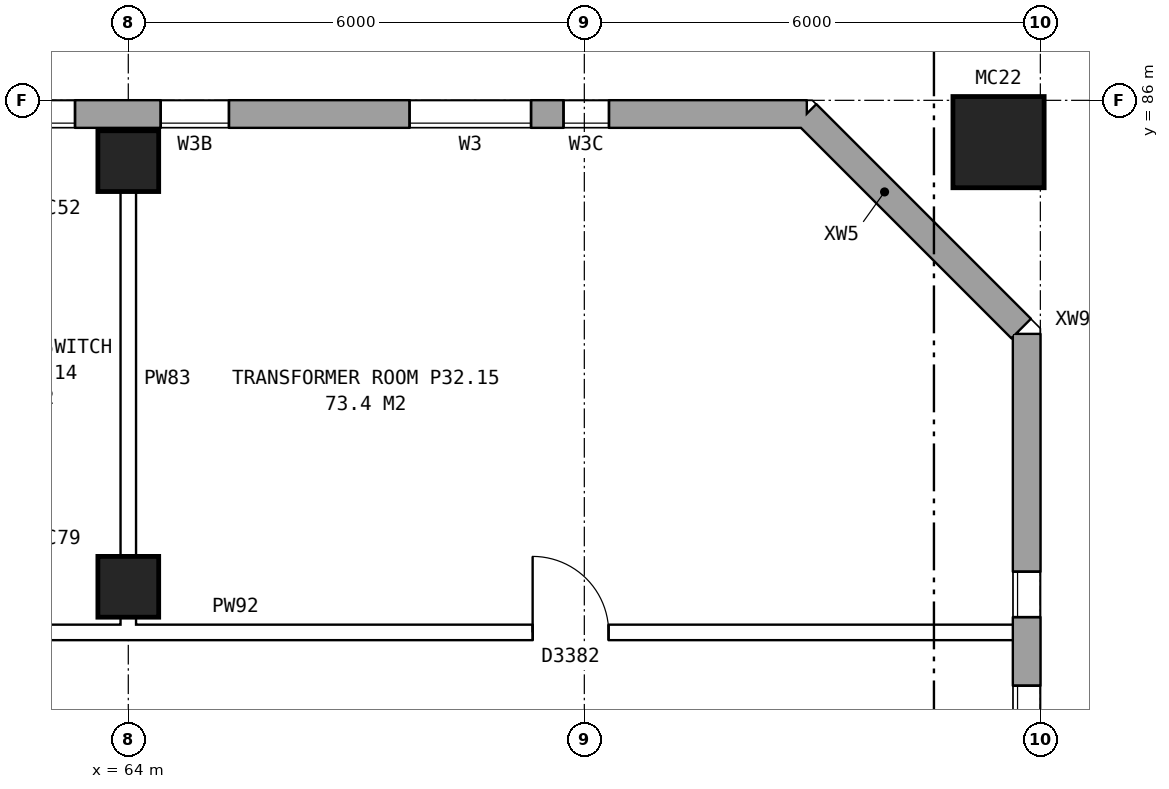
"""IFC4 building model, lengths in metres.
Left out: names, types, materials, properties, quantities, classifications, styles, units other than length and angle.
Written with IfcOpenShell. Run it as: python <this file> out.ifc"""

import sys

from ifc_helpers import new_model, si_unit, direction, frame, frame_2d, origin, origin_2d, place, context, subcontext, project, spatial, rectangle, hollow_rectangle, extrude, element, fill, save


model = new_model("IFC4")
c1 = context("Model", 3, precision=1e-05, world=origin(), true_north=direction((0.0, 1.0)))
c2 = subcontext(c1, "Body", "Model", "MODEL_VIEW")
j1 = project(units=[si_unit("LENGTHUNIT", "METRE"), si_unit("PLANEANGLEUNIT", "RADIAN")], contexts=[c1])
p1 = place(None, origin())
s1 = spatial("IfcSite", under=j1, at=p1, CompositionType="ELEMENT")
p2 = place(p1, origin())
s2 = spatial("IfcBuilding", under=s1, at=p2, CompositionType="ELEMENT")
p3 = place(p2, frame((0.0, 0.0, 115.0)))
s3 = spatial("IfcBuildingStorey", under=s2, at=p3, CompositionType="ELEMENT", Elevation=115.0)
for number, where, z_axis, x_axis in (
    (1, (64.0, 79.6, 0.0), (0.0, 0.0, 1.0), (1.0, 0.0, 0.0)),
    (2, (64.0, 85.2, 0.0), (0.0, 0.0, 1.0), (1.0, 0.0, 0.0)),
):
    element("IfcColumn", number, at=place(p3, frame(where, z_axis=z_axis, x_axis=x_axis)), inside=s3, PredefinedType="COLUMN", context=c2, shape_type="SweptSolid", body=[
        extrude(rectangle(XDim=0.8, YDim=0.8, at=origin_2d()), origin(), (0.0, 0.0, 1.0), 4.2),
    ])
p4 = place(p3, frame((75.45, 85.45, 0.0), z_axis=(0.0, 0.0, 1.0), x_axis=(1.0, 0.0, 0.0)))
e3 = element("IfcColumn", 3, at=p4, inside=s3, PredefinedType="COLUMN", context=c2, shape_type="SweptSolid", body=[
    extrude(hollow_rectangle(XDim=1.2, YDim=1.2, WallThickness=0.065, at=origin_2d()), origin(), (0.0, 0.0, 1.0), 4.5),
])
p5 = place(p3, frame((75.82, 57.075, 0.0), z_axis=(0.0, 0.0, 1.0), x_axis=(0.0, 1.0, 0.0)))
e4 = element("IfcWall", 4, at=p5, inside=s3, PredefinedType="STANDARD", context=c2, shape_type="SweptSolid", body=[
    extrude(rectangle(XDim=25.851, YDim=0.36, at=frame_2d((12.925, 0.0))), origin(), (0.0, 0.0, 1.0), 4.2),
])
p6 = place(p5, frame((2.9, 0.0, 1.5)))
e5 = element("IfcOpeningElement", 5, at=p6, cuts=e4, PredefinedType="OPENING", context=c2, shape_type="SweptSolid", body=[
    extrude(rectangle(XDim=0.6, YDim=1.2, at=frame_2d((0.3, 0.6))), frame((0.0, 0.19, 0.0), z_axis=(0.0, -1.0, 0.0), x_axis=(1.0, 0.0, 0.0)), (0.0, 0.0, 1.0), 0.38),
])
p7 = place(p5, frame((3.925, 0.0, 1.5)))
e6 = element("IfcOpeningElement", 6, at=p7, cuts=e4, PredefinedType="OPENING", context=c2, shape_type="SweptSolid", body=[
    extrude(rectangle(XDim=0.6, YDim=1.2, at=frame_2d((0.3, 0.6))), frame((0.0, 0.19, 0.0), z_axis=(0.0, -1.0, 0.0), x_axis=(1.0, 0.0, 0.0)), (0.0, 0.0, 1.0), 0.38),
])
p8 = place(p5, frame((19.625, 0.0, 1.5)))
e7 = element("IfcOpeningElement", 7, at=p8, cuts=e4, PredefinedType="OPENING", context=c2, shape_type="SweptSolid", body=[
    extrude(rectangle(XDim=1.6, YDim=1.2, at=frame_2d((0.8, 0.6))), frame((0.0, 0.19, 0.0), z_axis=(0.0, -1.0, 0.0), x_axis=(1.0, 0.0, 0.0)), (0.0, 0.0, 1.0), 0.38),
])
p9 = place(p5, frame((22.125, 0.0, 1.5)))
e8 = element("IfcOpeningElement", 8, at=p9, cuts=e4, PredefinedType="OPENING", context=c2, shape_type="SweptSolid", body=[
    extrude(rectangle(XDim=0.6, YDim=1.2, at=frame_2d((0.3, 0.6))), frame((0.0, 0.19, 0.0), z_axis=(0.0, -1.0, 0.0), x_axis=(1.0, 0.0, 0.0)), (0.0, 0.0, 1.0), 0.38),
])
p10 = place(p3, frame((75.746, 82.999, 0.953), z_axis=(0.0, 0.0, 1.0), x_axis=(-0.706994764273, 0.707218780358, 0.0)))
e9 = element("IfcWall", 9, at=p10, inside=s3, PredefinedType="STANDARD", context=c2, shape_type="SweptSolid", body=[
    extrude(rectangle(XDim=1.09, YDim=0.36, at=frame_2d((0.545, 0.0))), origin(), (0.0, 0.0, 1.0), 2.444),
])
p11 = place(p3, frame((74.976, 83.77, 0.0), z_axis=(0.0, 0.0, 1.0), x_axis=(-0.707148882153, 0.707064677713, 0.0)))
e10 = element("IfcWall", 10, at=p11, inside=s3, PredefinedType="STANDARD", context=c2, shape_type="SweptSolid", body=[
    extrude(rectangle(XDim=2.899, YDim=0.36, at=frame_2d((1.45, 0.0))), origin(), (0.0, 0.0, 1.0), 4.2),
])
p12 = place(p3, frame((72.925, 85.82, 0.0), z_axis=(0.0, 0.0, 1.0), x_axis=(-1.0, 0.0, 0.0)))
e11 = element("IfcWall", 11, at=p12, inside=s3, PredefinedType="STANDARD", context=c2, shape_type="SweptSolid", body=[
    extrude(rectangle(XDim=43.101, YDim=0.36, at=frame_2d((21.55, 0.0))), origin(), (0.0, 0.0, 1.0), 4.2),
])
p13 = place(p12, frame((2.6, 0.0, 1.5)))
e12 = element("IfcOpeningElement", 12, at=p13, cuts=e11, PredefinedType="OPENING", context=c2, shape_type="SweptSolid", body=[
    extrude(rectangle(XDim=0.6, YDim=1.2, at=frame_2d((0.3, 0.6))), frame((0.0, 0.19, 0.0), z_axis=(0.0, -1.0, 0.0), x_axis=(1.0, 0.0, 0.0)), (0.0, 0.0, 1.0), 0.38),
])
p14 = place(p12, frame((3.625, 0.0, 1.5)))
e13 = element("IfcOpeningElement", 13, at=p14, cuts=e11, PredefinedType="OPENING", context=c2, shape_type="SweptSolid", body=[
    extrude(rectangle(XDim=1.6, YDim=1.2, at=frame_2d((0.8, 0.6))), frame((0.0, 0.19, 0.0), z_axis=(0.0, -1.0, 0.0), x_axis=(1.0, 0.0, 0.0)), (0.0, 0.0, 1.0), 0.38),
])
p15 = place(p12, frame((7.6, 0.0, 1.5)))
e14 = element("IfcOpeningElement", 14, at=p15, cuts=e11, PredefinedType="OPENING", context=c2, shape_type="SweptSolid", body=[
    extrude(rectangle(XDim=0.9, YDim=1.2, at=frame_2d((0.45, 0.6))), frame((0.0, 0.19, 0.0), z_axis=(0.0, -1.0, 0.0), x_axis=(1.0, 0.0, 0.0)), (0.0, 0.0, 1.0), 0.38),
])
p16 = place(p12, frame((9.625, 0.0, 1.5)))
e15 = element("IfcOpeningElement", 15, at=p16, cuts=e11, PredefinedType="OPENING", context=c2, shape_type="SweptSolid", body=[
    extrude(rectangle(XDim=1.6, YDim=1.2, at=frame_2d((0.8, 0.6))), frame((0.0, 0.19, 0.0), z_axis=(0.0, -1.0, 0.0), x_axis=(1.0, 0.0, 0.0)), (0.0, 0.0, 1.0), 0.38),
])
p17 = place(p12, frame((11.525, 0.0, 1.5)))
e16 = element("IfcOpeningElement", 16, at=p17, cuts=e11, PredefinedType="OPENING", context=c2, shape_type="SweptSolid", body=[
    extrude(rectangle(XDim=0.6, YDim=1.2, at=frame_2d((0.3, 0.6))), frame((0.0, 0.19, 0.0), z_axis=(0.0, -1.0, 0.0), x_axis=(1.0, 0.0, 0.0)), (0.0, 0.0, 1.0), 0.38),
])
p18 = place(p12, frame((15.625, 0.0, 1.5)))
e17 = element("IfcOpeningElement", 17, at=p18, cuts=e11, PredefinedType="OPENING", context=c2, shape_type="SweptSolid", body=[
    extrude(rectangle(XDim=1.6, YDim=1.2, at=frame_2d((0.8, 0.6))), frame((0.0, 0.19, 0.0), z_axis=(0.0, -1.0, 0.0), x_axis=(1.0, 0.0, 0.0)), (0.0, 0.0, 1.0), 0.38),
])
p19 = place(p12, frame((20.075, 0.0, 1.5)))
e18 = element("IfcOpeningElement", 18, at=p19, cuts=e11, PredefinedType="OPENING", context=c2, shape_type="SweptSolid", body=[
    extrude(rectangle(XDim=1.2, YDim=1.2, at=frame_2d((0.6, 0.6))), frame((0.0, 0.19, 0.0), z_axis=(0.0, -1.0, 0.0), x_axis=(1.0, 0.0, 0.0)), (0.0, 0.0, 1.0), 0.38),
])
p20 = place(p12, frame((21.625, 0.0, 1.5)))
e19 = element("IfcOpeningElement", 19, at=p20, cuts=e11, PredefinedType="OPENING", context=c2, shape_type="SweptSolid", body=[
    extrude(rectangle(XDim=1.6, YDim=1.2, at=frame_2d((0.8, 0.6))), frame((0.0, 0.19, 0.0), z_axis=(0.0, -1.0, 0.0), x_axis=(1.0, 0.0, 0.0)), (0.0, 0.0, 1.0), 0.38),
])
p21 = place(p12, frame((24.125, 0.0, 1.5)))
e20 = element("IfcOpeningElement", 20, at=p21, cuts=e11, PredefinedType="OPENING", context=c2, shape_type="SweptSolid", body=[
    extrude(rectangle(XDim=0.6, YDim=1.2, at=frame_2d((0.3, 0.6))), frame((0.0, 0.19, 0.0), z_axis=(0.0, -1.0, 0.0), x_axis=(1.0, 0.0, 0.0)), (0.0, 0.0, 1.0), 0.38),
])
p22 = place(p12, frame((27.625, 0.0, 1.5)))
e21 = element("IfcOpeningElement", 21, at=p22, cuts=e11, PredefinedType="OPENING", context=c2, shape_type="SweptSolid", body=[
    extrude(rectangle(XDim=1.6, YDim=1.2, at=frame_2d((0.8, 0.6))), frame((0.0, 0.19, 0.0), z_axis=(0.0, -1.0, 0.0), x_axis=(1.0, 0.0, 0.0)), (0.0, 0.0, 1.0), 0.38),
])
p23 = place(p12, frame((32.525, 0.0, 1.5)))
e22 = element("IfcOpeningElement", 22, at=p23, cuts=e11, PredefinedType="OPENING", context=c2, shape_type="SweptSolid", body=[
    extrude(rectangle(XDim=0.6, YDim=1.2, at=frame_2d((0.3, 0.6))), frame((0.0, 0.19, 0.0), z_axis=(0.0, -1.0, 0.0), x_axis=(1.0, 0.0, 0.0)), (0.0, 0.0, 1.0), 0.38),
])
p24 = place(p12, frame((33.625, 0.0, 1.5)))
e23 = element("IfcOpeningElement", 23, at=p24, cuts=e11, PredefinedType="OPENING", context=c2, shape_type="SweptSolid", body=[
    extrude(rectangle(XDim=1.6, YDim=1.2, at=frame_2d((0.8, 0.6))), frame((0.0, 0.19, 0.0), z_axis=(0.0, -1.0, 0.0), x_axis=(1.0, 0.0, 0.0)), (0.0, 0.0, 1.0), 0.38),
])
p25 = place(p12, frame((36.125, 0.0, 1.5)))
e24 = element("IfcOpeningElement", 24, at=p25, cuts=e11, PredefinedType="OPENING", context=c2, shape_type="SweptSolid", body=[
    extrude(rectangle(XDim=0.9, YDim=1.2, at=frame_2d((0.45, 0.6))), frame((0.0, 0.19, 0.0), z_axis=(0.0, -1.0, 0.0), x_axis=(1.0, 0.0, 0.0)), (0.0, 0.0, 1.0), 0.38),
])
p26 = place(p12, frame((39.625, 0.0, 1.5)))
e25 = element("IfcOpeningElement", 25, at=p26, cuts=e11, PredefinedType="OPENING", context=c2, shape_type="SweptSolid", body=[
    extrude(rectangle(XDim=1.6, YDim=1.2, at=frame_2d((0.8, 0.6))), frame((0.0, 0.19, 0.0), z_axis=(0.0, -1.0, 0.0), x_axis=(1.0, 0.0, 0.0)), (0.0, 0.0, 1.0), 0.38),
])
p27 = place(p3, frame((30.9, 79.0, 0.0), z_axis=(0.0, 0.0, 1.0), x_axis=(1.0, 0.0, 0.0)))
e26 = element("IfcWall", 26, at=p27, inside=s3, PredefinedType="PARTITIONING", context=c2, shape_type="SweptSolid", body=[
    extrude(rectangle(XDim=44.86, YDim=0.2, at=frame_2d((22.43, 0.0))), origin(), (0.0, 0.0, 1.0), 4.2),
])
p28 = place(p27, frame((2.6, 0.0, 0.0)))
e27 = element("IfcOpeningElement", 27, at=p28, cuts=e26, PredefinedType="OPENING", context=c2, shape_type="SweptSolid", body=[
    extrude(rectangle(XDim=1.0, YDim=2.1, at=frame_2d((0.5, 1.05))), frame((0.0, 0.11, 0.0), z_axis=(0.0, -1.0, 0.0), x_axis=(1.0, 0.0, 0.0)), (0.0, 0.0, 1.0), 0.22),
])
p29 = place(p27, frame((9.5, 0.0, 0.0)))
e28 = element("IfcOpeningElement", 28, at=p29, cuts=e26, PredefinedType="OPENING", context=c2, shape_type="SweptSolid", body=[
    extrude(rectangle(XDim=1.0, YDim=2.1, at=frame_2d((0.5, 1.05))), frame((0.0, 0.11, 0.0), z_axis=(0.0, -1.0, 0.0), x_axis=(1.0, 0.0, 0.0)), (0.0, 0.0, 1.0), 0.22),
])
p30 = place(p27, frame((14.6, 0.0, 0.0)))
e29 = element("IfcOpeningElement", 29, at=p30, cuts=e26, PredefinedType="OPENING", context=c2, shape_type="SweptSolid", body=[
    extrude(rectangle(XDim=1.0, YDim=2.1, at=frame_2d((0.5, 1.05))), frame((0.0, 0.11, 0.0), z_axis=(0.0, -1.0, 0.0), x_axis=(1.0, 0.0, 0.0)), (0.0, 0.0, 1.0), 0.22),
])
p31 = place(p27, frame((22.1, 0.0, 0.0)))
e30 = element("IfcOpeningElement", 30, at=p31, cuts=e26, PredefinedType="OPENING", context=c2, shape_type="SweptSolid", body=[
    extrude(rectangle(XDim=1.0, YDim=2.1, at=frame_2d((0.5, 1.05))), frame((0.0, 0.11, 0.0), z_axis=(0.0, -1.0, 0.0), x_axis=(1.0, 0.0, 0.0)), (0.0, 0.0, 1.0), 0.22),
])
p32 = place(p27, frame((29.6, 0.0, 0.0)))
e31 = element("IfcOpeningElement", 31, at=p32, cuts=e26, PredefinedType="OPENING", context=c2, shape_type="SweptSolid", body=[
    extrude(rectangle(XDim=1.0, YDim=2.1, at=frame_2d((0.5, 1.05))), frame((0.0, 0.11, 0.0), z_axis=(0.0, -1.0, 0.0), x_axis=(1.0, 0.0, 0.0)), (0.0, 0.0, 1.0), 0.22),
])
p33 = place(p27, frame((38.42, 0.0, 0.0)))
e32 = element("IfcOpeningElement", 32, at=p33, cuts=e26, PredefinedType="OPENING", context=c2, shape_type="SweptSolid", body=[
    extrude(rectangle(XDim=1.0, YDim=2.1, at=frame_2d((0.5, 1.05))), frame((0.0, 0.11, 0.0), z_axis=(0.0, -1.0, 0.0), x_axis=(1.0, 0.0, 0.0)), (0.0, 0.0, 1.0), 0.22),
])
p34 = place(p3, frame((64.0, 78.9, 0.0), z_axis=(0.0, 0.0, 1.0), x_axis=(0.0, 1.0, 0.0)))
e33 = element("IfcWall", 33, at=p34, inside=s3, PredefinedType="PARTITIONING", context=c2, shape_type="SweptSolid", body=[
    extrude(rectangle(XDim=6.86, YDim=0.2, at=frame_2d((3.43, 0.0))), origin(), (0.0, 0.0, 1.0), 4.2),
])
p35 = place(p8, origin())
e34 = element("IfcWindow", 34, at=p35, inside=s3, PartitioningType="DOUBLE_PANEL_HORIZONTAL", PredefinedType="WINDOW", context=c2, shape_type="SweptSolid", body=[
    extrude(rectangle(XDim=1.6, YDim=1.2, at=frame_2d((0.8, 0.6))), frame((0.0, 0.15, 0.0), z_axis=(0.0, -1.0, 0.0), x_axis=(1.0, 0.0, 0.0)), (0.0, 0.0, 1.0), 0.06),
])
fill(e7, e34)
p36 = place(p9, origin())
e35 = element("IfcWindow", 35, at=p36, inside=s3, PartitioningType="DOUBLE_PANEL_HORIZONTAL", PredefinedType="WINDOW", context=c2, shape_type="SweptSolid", body=[
    extrude(rectangle(XDim=0.6, YDim=1.2, at=frame_2d((0.3, 0.6))), frame((0.0, 0.15, 0.0), z_axis=(0.0, -1.0, 0.0), x_axis=(1.0, 0.0, 0.0)), (0.0, 0.0, 1.0), 0.06),
])
fill(e8, e35)
p37 = place(p13, origin())
e36 = element("IfcWindow", 36, at=p37, inside=s3, PartitioningType="DOUBLE_PANEL_HORIZONTAL", PredefinedType="WINDOW", context=c2, shape_type="SweptSolid", body=[
    extrude(rectangle(XDim=0.6, YDim=1.2, at=frame_2d((0.3, 0.6))), frame((0.0, 0.15, 0.0), z_axis=(0.0, -1.0, 0.0), x_axis=(1.0, 0.0, 0.0)), (0.0, 0.0, 1.0), 0.06),
])
fill(e12, e36)
p38 = place(p14, origin())
e37 = element("IfcWindow", 37, at=p38, inside=s3, PartitioningType="DOUBLE_PANEL_HORIZONTAL", PredefinedType="WINDOW", context=c2, shape_type="SweptSolid", body=[
    extrude(rectangle(XDim=1.6, YDim=1.2, at=frame_2d((0.8, 0.6))), frame((0.0, 0.15, 0.0), z_axis=(0.0, -1.0, 0.0), x_axis=(1.0, 0.0, 0.0)), (0.0, 0.0, 1.0), 0.06),
])
fill(e13, e37)
p39 = place(p15, origin())
e38 = element("IfcWindow", 38, at=p39, inside=s3, PartitioningType="DOUBLE_PANEL_HORIZONTAL", PredefinedType="WINDOW", context=c2, shape_type="SweptSolid", body=[
    extrude(rectangle(XDim=0.9, YDim=1.2, at=frame_2d((0.45, 0.6))), frame((0.0, 0.15, 0.0), z_axis=(0.0, -1.0, 0.0), x_axis=(1.0, 0.0, 0.0)), (0.0, 0.0, 1.0), 0.06),
])
fill(e14, e38)
p40 = place(p16, origin())
e39 = element("IfcWindow", 39, at=p40, inside=s3, PartitioningType="DOUBLE_PANEL_HORIZONTAL", PredefinedType="WINDOW", context=c2, shape_type="SweptSolid", body=[
    extrude(rectangle(XDim=1.6, YDim=1.2, at=frame_2d((0.8, 0.6))), frame((0.0, 0.15, 0.0), z_axis=(0.0, -1.0, 0.0), x_axis=(1.0, 0.0, 0.0)), (0.0, 0.0, 1.0), 0.06),
])
fill(e15, e39)
p41 = place(p33, origin())
e40 = element("IfcDoor", 40, at=p41, inside=s3, OperationType="SINGLE_SWING_LEFT", PredefinedType="DOOR", context=c2, shape_type="SweptSolid", body=[
    extrude(rectangle(XDim=1.0, YDim=2.1, at=frame_2d((0.5, 1.05))), frame((0.0, 0.025, 0.0), z_axis=(0.0, -1.0, 0.0), x_axis=(1.0, 0.0, 0.0)), (0.0, 0.0, 1.0), 0.05),
])
fill(e32, e40)
save(model, sys.argv[1])
